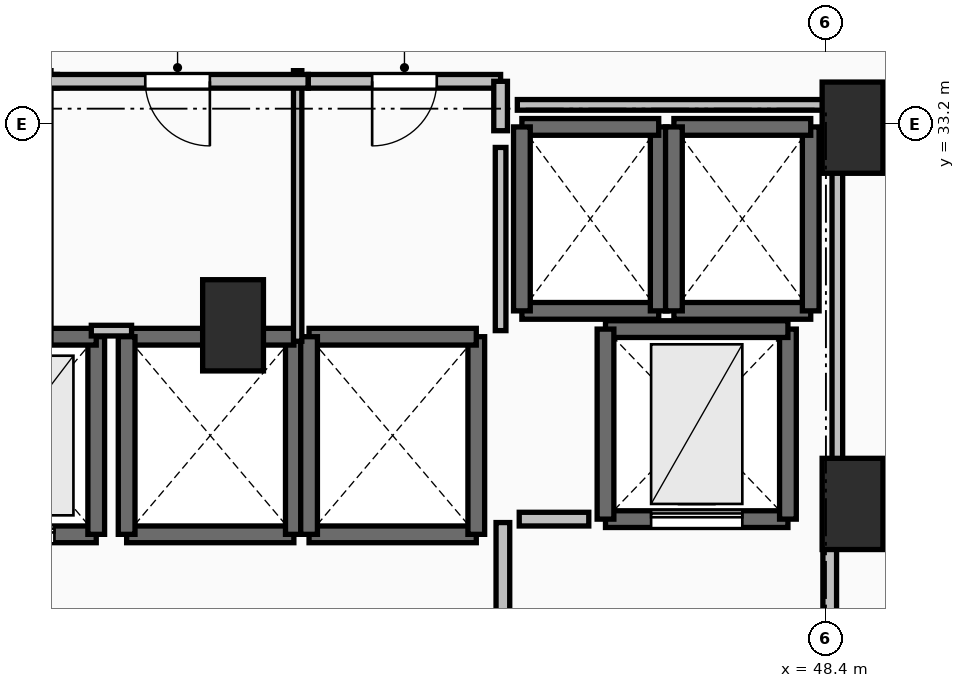
"""IFC4 building model, lengths in metres.
Left out: names, types, materials, properties, quantities, classifications, styles, units other than length and angle.
Written with IfcOpenShell. Run it as: python <this file> out.ifc"""

import sys

from ifc_helpers import new_model, si_unit, direction, frame, frame_2d, origin, origin_2d, place, context, subcontext, project, spatial, rectangle, extrude, element, fill, save


model = new_model("IFC4")
c1 = context("Model", 3, precision=1e-05, world=origin(), true_north=direction((0.0, 1.0)))
c2 = subcontext(c1, "Body", "Model", "MODEL_VIEW")
j1 = project(units=[si_unit("LENGTHUNIT", "METRE"), si_unit("PLANEANGLEUNIT", "RADIAN")], contexts=[c1])
p1 = place(None, origin())
s1 = spatial("IfcSite", under=j1, at=p1, CompositionType="ELEMENT")
p2 = place(p1, origin())
s2 = spatial("IfcBuilding", under=s1, at=p2, CompositionType="ELEMENT")
p3 = place(p2, frame((0.0, 0.0, 99.8)))
s3 = spatial("IfcBuildingStorey", under=s2, at=p3, CompositionType="ELEMENT", Elevation=99.8)
for number, where, z_axis, x_axis in (
    (1, (48.75, 33.15, 0.0), (0.0, 0.0, 1.0), (1.0, 0.0, 0.0)),
    (2, (48.75, 28.2, 0.0), (0.0, 0.0, 1.0), (1.0, 0.0, 0.0)),
    (3, (40.6, 30.55, 0.0), (0.0, 0.0, 1.0), (1.0, 0.0, 0.0)),
):
    element("IfcColumn", number, at=place(p3, frame(where, z_axis=z_axis, x_axis=x_axis)), inside=s3, PredefinedType="PILASTER", context=c2, shape_type="SweptSolid", body=[
        extrude(rectangle(XDim=0.8, YDim=1.2, at=origin_2d()), origin(), (0.0, 0.0, 1.0), 3.5),
    ])
p4 = place(p3, frame((36.6, 27.8, 0.0), z_axis=(0.0, 0.0, 1.0), x_axis=(1.0, 0.0, 0.0)))
e4 = element("IfcWall", 4, at=p4, inside=s3, PredefinedType="SOLIDWALL", context=c2, shape_type="SweptSolid", body=[
    extrude(rectangle(XDim=2.2, YDim=0.22, at=frame_2d((1.1, 0.0))), origin(), (0.0, 0.0, 1.0), 3.24),
])
p5 = place(p4, frame((0.55, 0.0, 0.0)))
e5 = element("IfcOpeningElement", 5, at=p5, cuts=e4, PredefinedType="OPENING", context=c2, shape_type="SweptSolid", body=[
    extrude(rectangle(XDim=1.1, YDim=2.2, at=frame_2d((0.55, 1.1))), frame((0.0, 0.125, 0.0), z_axis=(0.0, -1.0, 0.0), x_axis=(1.0, 0.0, 0.0)), (0.0, 0.0, 1.0), 0.25),
])
p6 = place(p3, frame((38.8, 27.8, 0.0), z_axis=(0.0, 0.0, 1.0), x_axis=(0.0, 1.0, 0.0)))
e6 = element("IfcWall", 6, at=p6, inside=s3, PredefinedType="SOLIDWALL", context=c2, shape_type="SweptSolid", body=[
    extrude(rectangle(XDim=2.6, YDim=0.22, at=frame_2d((1.3, 0.0))), origin(), (0.0, 0.0, 1.0), 3.24),
])
for number, where, z_axis, x_axis in (
    (7, (38.8, 30.4, 0.0), (0.0, 0.0, 1.0), (-1.0, 0.0, 0.0)),
    (8, (39.2, 27.8, 0.0), (0.0, 0.0, 1.0), (1.0, 0.0, 0.0)),
):
    element("IfcWall", number, at=place(p3, frame(where, z_axis=z_axis, x_axis=x_axis)), inside=s3, PredefinedType="SOLIDWALL", context=c2, shape_type="SweptSolid", body=[
        extrude(rectangle(XDim=2.2, YDim=0.22, at=frame_2d((1.1, 0.0))), origin(), (0.0, 0.0, 1.0), 3.24),
    ])
p7 = place(p3, frame((41.4, 27.8, 0.0), z_axis=(0.0, 0.0, 1.0), x_axis=(0.0, 1.0, 0.0)))
e9 = element("IfcWall", 9, at=p7, inside=s3, PredefinedType="SOLIDWALL", context=c2, shape_type="SweptSolid", body=[
    extrude(rectangle(XDim=2.6, YDim=0.22, at=frame_2d((1.3, 0.0))), origin(), (0.0, 0.0, 1.0), 3.24),
])
p8 = place(p3, frame((41.4, 30.4, 0.0), z_axis=(0.0, 0.0, 1.0), x_axis=(-1.0, 0.0, 0.0)))
e10 = element("IfcWall", 10, at=p8, inside=s3, PredefinedType="SOLIDWALL", context=c2, shape_type="SweptSolid", body=[
    extrude(rectangle(XDim=2.2, YDim=0.22, at=frame_2d((1.1, 0.0))), origin(), (0.0, 0.0, 1.0), 3.24),
])
p9 = place(p3, frame((39.2, 30.4, 0.0), z_axis=(0.0, 0.0, 1.0), x_axis=(0.0, -1.0, 0.0)))
e11 = element("IfcWall", 11, at=p9, inside=s3, PredefinedType="SOLIDWALL", context=c2, shape_type="SweptSolid", body=[
    extrude(rectangle(XDim=2.6, YDim=0.22, at=frame_2d((1.3, 0.0))), origin(), (0.0, 0.0, 1.0), 3.24),
])
p10 = place(p3, frame((41.6, 27.8, 0.0), z_axis=(0.0, 0.0, 1.0), x_axis=(1.0, 0.0, 0.0)))
e12 = element("IfcWall", 12, at=p10, inside=s3, PredefinedType="SOLIDWALL", context=c2, shape_type="SweptSolid", body=[
    extrude(rectangle(XDim=2.2, YDim=0.22, at=frame_2d((1.1, 0.0))), origin(), (0.0, 0.0, 1.0), 3.24),
])
p11 = place(p3, frame((43.8, 27.8, 0.0), z_axis=(0.0, 0.0, 1.0), x_axis=(0.0, 1.0, 0.0)))
e13 = element("IfcWall", 13, at=p11, inside=s3, PredefinedType="SOLIDWALL", context=c2, shape_type="SweptSolid", body=[
    extrude(rectangle(XDim=2.6, YDim=0.22, at=frame_2d((1.3, 0.0))), origin(), (0.0, 0.0, 1.0), 3.24),
])
p12 = place(p3, frame((43.8, 30.4, 0.0), z_axis=(0.0, 0.0, 1.0), x_axis=(-1.0, 0.0, 0.0)))
e14 = element("IfcWall", 14, at=p12, inside=s3, PredefinedType="SOLIDWALL", context=c2, shape_type="SweptSolid", body=[
    extrude(rectangle(XDim=2.2, YDim=0.22, at=frame_2d((1.1, 0.0))), origin(), (0.0, 0.0, 1.0), 3.24),
])
p13 = place(p3, frame((41.6, 30.4, 0.0), z_axis=(0.0, 0.0, 1.0), x_axis=(0.0, -1.0, 0.0)))
e15 = element("IfcWall", 15, at=p13, inside=s3, PredefinedType="SOLIDWALL", context=c2, shape_type="SweptSolid", body=[
    extrude(rectangle(XDim=2.6, YDim=0.22, at=frame_2d((1.3, 0.0))), origin(), (0.0, 0.0, 1.0), 3.24),
])
p14 = place(p3, frame((44.4, 30.74, 0.0), z_axis=(0.0, 0.0, 1.0), x_axis=(1.0, 0.0, 0.0)))
e16 = element("IfcWall", 16, at=p14, inside=s3, PredefinedType="SOLIDWALL", context=c2, shape_type="SweptSolid", body=[
    extrude(rectangle(XDim=1.8, YDim=0.22, at=frame_2d((0.9, 0.0))), origin(), (0.0, 0.0, 1.0), 3.24),
])
p15 = place(p3, frame((46.2, 30.74, 0.0), z_axis=(0.0, 0.0, 1.0), x_axis=(0.0, 1.0, 0.0)))
e17 = element("IfcWall", 17, at=p15, inside=s3, PredefinedType="SOLIDWALL", context=c2, shape_type="SweptSolid", body=[
    extrude(rectangle(XDim=2.42, YDim=0.22, at=frame_2d((1.21, 0.0))), origin(), (0.0, 0.0, 1.0), 3.24),
])
p16 = place(p3, frame((46.2, 33.16, 0.0), z_axis=(0.0, 0.0, 1.0), x_axis=(-1.0, 0.0, 0.0)))
e18 = element("IfcWall", 18, at=p16, inside=s3, PredefinedType="SOLIDWALL", context=c2, shape_type="SweptSolid", body=[
    extrude(rectangle(XDim=1.8, YDim=0.22, at=frame_2d((0.9, 0.0))), origin(), (0.0, 0.0, 1.0), 3.24),
])
p17 = place(p3, frame((44.4, 33.16, 0.0), z_axis=(0.0, 0.0, 1.0), x_axis=(0.0, -1.0, 0.0)))
e19 = element("IfcWall", 19, at=p17, inside=s3, PredefinedType="SOLIDWALL", context=c2, shape_type="SweptSolid", body=[
    extrude(rectangle(XDim=2.42, YDim=0.22, at=frame_2d((1.21, 0.0))), origin(), (0.0, 0.0, 1.0), 3.24),
])
p18 = place(p3, frame((46.4, 30.74, 0.0), z_axis=(0.0, 0.0, 1.0), x_axis=(1.0, 0.0, 0.0)))
e20 = element("IfcWall", 20, at=p18, inside=s3, PredefinedType="SOLIDWALL", context=c2, shape_type="SweptSolid", body=[
    extrude(rectangle(XDim=1.8, YDim=0.22, at=frame_2d((0.9, 0.0))), origin(), (0.0, 0.0, 1.0), 3.24),
])
p19 = place(p3, frame((48.2, 30.74, 0.0), z_axis=(0.0, 0.0, 1.0), x_axis=(0.0, 1.0, 0.0)))
e21 = element("IfcWall", 21, at=p19, inside=s3, PredefinedType="SOLIDWALL", context=c2, shape_type="SweptSolid", body=[
    extrude(rectangle(XDim=2.42, YDim=0.22, at=frame_2d((1.21, 0.0))), origin(), (0.0, 0.0, 1.0), 3.24),
])
p20 = place(p3, frame((48.2, 33.16, 0.0), z_axis=(0.0, 0.0, 1.0), x_axis=(-1.0, 0.0, 0.0)))
e22 = element("IfcWall", 22, at=p20, inside=s3, PredefinedType="SOLIDWALL", context=c2, shape_type="SweptSolid", body=[
    extrude(rectangle(XDim=1.8, YDim=0.22, at=frame_2d((0.9, 0.0))), origin(), (0.0, 0.0, 1.0), 3.24),
])
p21 = place(p3, frame((46.4, 33.16, 0.0), z_axis=(0.0, 0.0, 1.0), x_axis=(0.0, -1.0, 0.0)))
e23 = element("IfcWall", 23, at=p21, inside=s3, PredefinedType="SOLIDWALL", context=c2, shape_type="SweptSolid", body=[
    extrude(rectangle(XDim=2.42, YDim=0.22, at=frame_2d((1.21, 0.0))), origin(), (0.0, 0.0, 1.0), 3.24),
])
p22 = place(p3, frame((45.5, 28.0, 0.0), z_axis=(0.0, 0.0, 1.0), x_axis=(1.0, 0.0, 0.0)))
e24 = element("IfcWall", 24, at=p22, inside=s3, PredefinedType="SHEAR", context=c2, shape_type="SweptSolid", body=[
    extrude(rectangle(XDim=2.4, YDim=0.22, at=frame_2d((1.2, 0.0))), origin(), (0.0, 0.0, 1.0), 3.24),
])
p23 = place(p22, frame((0.6, 0.0, 0.0)))
e25 = element("IfcOpeningElement", 25, at=p23, cuts=e24, PredefinedType="OPENING", context=c2, shape_type="SweptSolid", body=[
    extrude(rectangle(XDim=1.2, YDim=2.2, at=frame_2d((0.6, 1.1))), frame((0.0, 0.125, 0.0), z_axis=(0.0, -1.0, 0.0), x_axis=(1.0, 0.0, 0.0)), (0.0, 0.0, 1.0), 0.25),
])
p24 = place(p3, frame((47.9, 28.0, 0.0), z_axis=(0.0, 0.0, 1.0), x_axis=(0.0, 1.0, 0.0)))
e26 = element("IfcWall", 26, at=p24, inside=s3, PredefinedType="SHEAR", context=c2, shape_type="SweptSolid", body=[
    extrude(rectangle(XDim=2.5, YDim=0.22, at=frame_2d((1.25, 0.0))), origin(), (0.0, 0.0, 1.0), 3.24),
])
p25 = place(p3, frame((47.9, 30.5, 0.0), z_axis=(0.0, 0.0, 1.0), x_axis=(-1.0, 0.0, 0.0)))
e27 = element("IfcWall", 27, at=p25, inside=s3, PredefinedType="SHEAR", context=c2, shape_type="SweptSolid", body=[
    extrude(rectangle(XDim=2.4, YDim=0.22, at=frame_2d((1.2, 0.0))), origin(), (0.0, 0.0, 1.0), 3.24),
])
p26 = place(p3, frame((45.5, 30.5, 0.0), z_axis=(0.0, 0.0, 1.0), x_axis=(0.0, -1.0, 0.0)))
e28 = element("IfcWall", 28, at=p26, inside=s3, PredefinedType="SHEAR", context=c2, shape_type="SweptSolid", body=[
    extrude(rectangle(XDim=2.5, YDim=0.22, at=frame_2d((1.25, 0.0))), origin(), (0.0, 0.0, 1.0), 3.24),
])
p27 = place(p3, frame((44.15, 27.955, 0.0), z_axis=(0.0, 0.0, 1.0), x_axis=(0.0, -1.0, 0.0)))
e29 = element("IfcWall", 29, at=p27, inside=s3, PredefinedType="PARTITIONING", context=c2, shape_type="SweptSolid", body=[
    extrude(rectangle(XDim=3.91, YDim=0.18, at=frame_2d((1.955, 0.0))), origin(), (0.0, 0.0, 1.0), 3.24),
])
p28 = place(p27, frame((1.355, 0.0, 0.0)))
e30 = element("IfcOpeningElement", 30, at=p28, cuts=e29, PredefinedType="OPENING", context=c2, shape_type="SweptSolid", body=[
    extrude(rectangle(XDim=1.2, YDim=2.15, at=frame_2d((0.6, 1.075))), frame((0.0, 0.105, 0.0), z_axis=(0.0, -1.0, 0.0), x_axis=(1.0, 0.0, 0.0)), (0.0, 0.0, 1.0), 0.21),
])
p29 = place(p3, frame((48.45, 23.95, 0.0), z_axis=(0.0, 0.0, 1.0), x_axis=(0.0, 1.0, 0.0)))
e31 = element("IfcWall", 31, at=p29, inside=s3, PredefinedType="PARTITIONING", context=c2, shape_type="SweptSolid", body=[
    extrude(rectangle(XDim=4.05, YDim=0.18, at=frame_2d((2.025, 0.0))), origin(), (0.0, 0.0, 1.0), 3.24),
])
p30 = place(p29, frame((1.425, 0.0, 0.0)))
e32 = element("IfcOpeningElement", 32, at=p30, cuts=e31, PredefinedType="OPENING", context=c2, shape_type="SweptSolid", body=[
    extrude(rectangle(XDim=1.2, YDim=2.15, at=frame_2d((0.6, 1.075))), frame((0.0, 0.105, 0.0), z_axis=(0.0, -1.0, 0.0), x_axis=(1.0, 0.0, 0.0)), (0.0, 0.0, 1.0), 0.21),
])
p31 = place(p3, frame((38.29, 33.76, 0.0), z_axis=(0.0, 0.0, 1.0), x_axis=(-1.0, 0.0, 0.0)))
e33 = element("IfcWall", 33, at=p31, inside=s3, PredefinedType="PARTITIONING", context=c2, shape_type="SweptSolid", body=[
    extrude(rectangle(XDim=2.74, YDim=0.18, at=frame_2d((1.37, 0.0))), origin(), (0.0, 0.0, 1.0), 3.24),
])
p32 = place(p31, frame((0.945, 0.0, 0.0)))
e34 = element("IfcOpeningElement", 34, at=p32, cuts=e33, PredefinedType="OPENING", context=c2, shape_type="SweptSolid", body=[
    extrude(rectangle(XDim=0.85, YDim=2.1, at=frame_2d((0.425, 1.05))), frame((0.0, 0.105, 0.0), z_axis=(0.0, -1.0, 0.0), x_axis=(1.0, 0.0, 0.0)), (0.0, 0.0, 1.0), 0.21),
])
p33 = place(p3, frame((41.45, 30.34, 0.0), z_axis=(0.0, 0.0, 1.0), x_axis=(0.0, 1.0, 0.0)))
e35 = element("IfcWall", 35, at=p33, inside=s3, PredefinedType="PARTITIONING", context=c2, shape_type="SweptSolid", body=[
    extrude(rectangle(XDim=3.56, YDim=0.11, at=frame_2d((1.78, 0.0))), origin(), (0.0, 0.0, 1.0), 3.24),
])
p34 = place(p3, frame((41.59, 33.76, 0.0), z_axis=(0.0, 0.0, 1.0), x_axis=(-1.0, 0.0, 0.0)))
e36 = element("IfcWall", 36, at=p34, inside=s3, PredefinedType="PARTITIONING", context=c2, shape_type="SweptSolid", body=[
    extrude(rectangle(XDim=3.44, YDim=0.18, at=frame_2d((1.72, 0.0))), origin(), (0.0, 0.0, 1.0), 3.24),
])
p35 = place(p34, frame((1.295, 0.0, 0.0)))
e37 = element("IfcOpeningElement", 37, at=p35, cuts=e36, PredefinedType="OPENING", context=c2, shape_type="SweptSolid", body=[
    extrude(rectangle(XDim=0.85, YDim=2.1, at=frame_2d((0.425, 1.05))), frame((0.0, 0.105, 0.0), z_axis=(0.0, -1.0, 0.0), x_axis=(1.0, 0.0, 0.0)), (0.0, 0.0, 1.0), 0.21),
])
p36 = place(p3, frame((44.12, 33.76, 0.0), z_axis=(0.0, 0.0, 1.0), x_axis=(-1.0, 0.0, 0.0)))
e38 = element("IfcWall", 38, at=p36, inside=s3, PredefinedType="PARTITIONING", context=c2, shape_type="SweptSolid", body=[
    extrude(rectangle(XDim=2.53, YDim=0.18, at=frame_2d((1.265, 0.0))), origin(), (0.0, 0.0, 1.0), 3.24),
])
p37 = place(p36, frame((0.84, 0.0, 0.0)))
e39 = element("IfcOpeningElement", 39, at=p37, cuts=e38, PredefinedType="OPENING", context=c2, shape_type="SweptSolid", body=[
    extrude(rectangle(XDim=0.85, YDim=2.1, at=frame_2d((0.425, 1.05))), frame((0.0, 0.105, 0.0), z_axis=(0.0, -1.0, 0.0), x_axis=(1.0, 0.0, 0.0)), (0.0, 0.0, 1.0), 0.21),
])
p38 = place(p3, frame((44.12, 33.11, 0.0), z_axis=(0.0, 0.0, 1.0), x_axis=(0.0, 1.0, 0.0)))
e40 = element("IfcWall", 40, at=p38, inside=s3, PredefinedType="PARTITIONING", context=c2, shape_type="SweptSolid", body=[
    extrude(rectangle(XDim=0.65, YDim=0.18, at=frame_2d((0.325, 0.0))), origin(), (0.0, 0.0, 1.0), 3.24),
])
p39 = place(p3, frame((45.28, 28.0, 0.0), z_axis=(0.0, 0.0, 1.0), x_axis=(-1.0, 0.0, 0.0)))
e41 = element("IfcWall", 41, at=p39, inside=s3, PredefinedType="PARTITIONING", context=c2, shape_type="SweptSolid", body=[
    extrude(rectangle(XDim=0.915, YDim=0.18, at=frame_2d((0.458, 0.0))), origin(), (0.0, 0.0, 1.0), 3.24),
])
p40 = place(p3, frame((38.735, 30.48, 0.0), z_axis=(0.0, 0.0, 1.0), x_axis=(1.0, 0.0, 0.0)))
e42 = element("IfcWall", 42, at=p40, inside=s3, PredefinedType="PARTITIONING", context=c2, shape_type="SweptSolid", body=[
    extrude(rectangle(XDim=0.53, YDim=0.14, at=frame_2d((0.265, 0.0))), origin(), (0.0, 0.0, 1.0), 2.432),
])
p41 = place(p3, frame((44.12, 30.48, 0.0), z_axis=(0.0, 0.0, 1.0), x_axis=(0.0, 1.0, 0.0)))
e43 = element("IfcWall", 43, at=p41, inside=s3, PredefinedType="PARTITIONING", context=c2, shape_type="SweptSolid", body=[
    extrude(rectangle(XDim=2.41, YDim=0.14, at=frame_2d((1.205, 0.0))), origin(), (0.0, 0.0, 1.0), 3.24),
])
p42 = place(p3, frame((44.34, 33.45, 0.0), z_axis=(0.0, 0.0, 1.0), x_axis=(1.0, 0.0, 0.0)))
e44 = element("IfcWall", 44, at=p42, inside=s3, PredefinedType="PARTITIONING", context=c2, shape_type="SweptSolid", body=[
    extrude(rectangle(XDim=4.21, YDim=0.14, at=frame_2d((2.105, 0.0))), origin(), (0.0, 0.0, 1.0), 2.432),
])
p43 = place(p3, frame((48.55, 33.45, 0.0), z_axis=(0.0, 0.0, 1.0), x_axis=(0.0, -1.0, 0.0)))
e45 = element("IfcWall", 45, at=p43, inside=s3, PredefinedType="PARTITIONING", context=c2, shape_type="SweptSolid", body=[
    extrude(rectangle(XDim=5.254, YDim=0.14, at=frame_2d((2.627, 0.0))), origin(), (0.0, 0.0, 1.0), 2.432),
])
p44 = place(p5, origin())
e46 = element("IfcDoor", 46, at=p44, inside=s3, OperationType="SLIDING_TO_LEFT", PredefinedType="DOOR", context=c2, shape_type="SweptSolid", body=[
    extrude(rectangle(XDim=1.1, YDim=2.2, at=frame_2d((0.55, 1.1))), frame((0.0, 0.025, 0.0), z_axis=(0.0, -1.0, 0.0), x_axis=(1.0, 0.0, 0.0)), (0.0, 0.0, 1.0), 0.05),
])
fill(e5, e46)
p45 = place(p23, origin())
e47 = element("IfcDoor", 47, at=p45, inside=s3, OperationType="SLIDING_TO_LEFT", PredefinedType="DOOR", context=c2, shape_type="SweptSolid", body=[
    extrude(rectangle(XDim=1.2, YDim=2.2, at=frame_2d((0.6, 1.1))), frame((0.0, 0.025, 0.0), z_axis=(0.0, -1.0, 0.0), x_axis=(1.0, 0.0, 0.0)), (0.0, 0.0, 1.0), 0.05),
])
fill(e25, e47)
p46 = place(p35, origin())
e48 = element("IfcDoor", 48, at=p46, inside=s3, OperationType="SINGLE_SWING_LEFT", PredefinedType="DOOR", context=c2, shape_type="SweptSolid", body=[
    extrude(rectangle(XDim=0.85, YDim=2.1, at=frame_2d((0.425, 1.05))), frame((0.0, 0.025, 0.0), z_axis=(0.0, -1.0, 0.0), x_axis=(1.0, 0.0, 0.0)), (0.0, 0.0, 1.0), 0.05),
])
fill(e37, e48)
p47 = place(p37, origin())
e49 = element("IfcDoor", 49, at=p47, inside=s3, OperationType="SINGLE_SWING_RIGHT", PredefinedType="DOOR", context=c2, shape_type="SweptSolid", body=[
    extrude(rectangle(XDim=0.85, YDim=2.1, at=frame_2d((0.425, 1.05))), frame((0.0, 0.025, 0.0), z_axis=(0.0, -1.0, 0.0), x_axis=(1.0, 0.0, 0.0)), (0.0, 0.0, 1.0), 0.05),
])
fill(e39, e49)
save(model, sys.argv[1])
